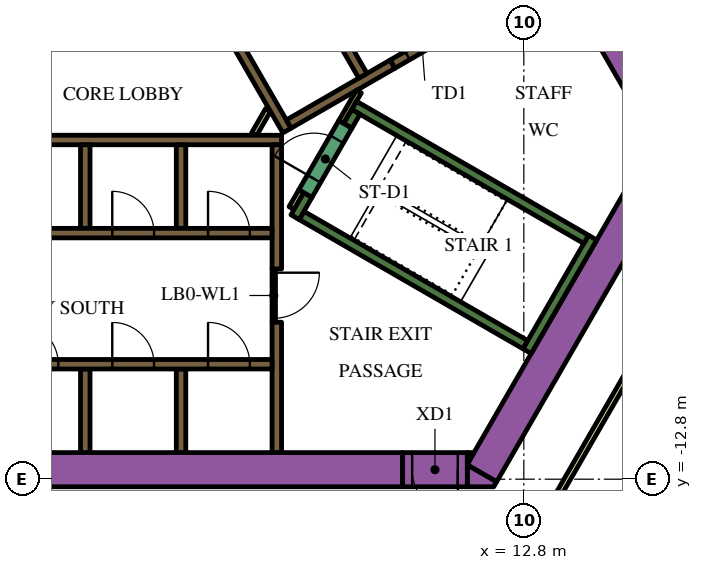
"""IFC4 building model, lengths in metres.
Left out: names, types, materials, properties, quantities, classifications, styles, units other than length and angle.
Written with IfcOpenShell. Run it as: python <this file> out.ifc"""

import sys

from ifc_helpers import new_model, si_unit, direction, frame, frame_2d, origin, place, context, subcontext, project, spatial, polyline, rectangle, outline, extrude, element, fill, save


model = new_model("IFC4")
c1 = context("Model", 3, precision=1e-05, world=origin(), true_north=direction((0.0, 1.0)))
c2 = subcontext(c1, "Body", "Model", "MODEL_VIEW")
j1 = project(units=[si_unit("LENGTHUNIT", "METRE"), si_unit("PLANEANGLEUNIT", "RADIAN")], contexts=[c1])
p1 = place(None, origin())
s1 = spatial("IfcSite", under=j1, at=p1, CompositionType="ELEMENT")
p2 = place(p1, origin())
s2 = spatial("IfcBuilding", under=s1, at=p2, CompositionType="ELEMENT")
p3 = place(p2, frame((0.0, 0.0, 111.0)))
s3 = spatial("IfcBuildingStorey", under=s2, at=p3, CompositionType="ELEMENT", Elevation=111.0)
p4 = place(p3, frame((6.711, 13.476, 0.0), z_axis=(0.0, 0.0, 1.0), x_axis=(0.500002723396, -0.866023831425, 0.0)))
e1 = element("IfcWall", 1, at=p4, inside=s3, PredefinedType="SOLIDWALL", context=c2, shape_type="SweptSolid", body=[
    extrude(rectangle(XDim=20.334, YDim=0.9, at=frame_2d((10.167, 0.0))), origin(), (0.0, 0.0, 1.0), 3.9),
])
p5 = place(p3, frame((11.695, -12.644, 0.0), z_axis=(0.0, 0.0, 1.0), x_axis=(0.500010229568, 0.86601949766, 0.0)))
e2 = element("IfcWall", 2, at=p5, inside=s3, PredefinedType="SOLIDWALL", context=c2, shape_type="SweptSolid", body=[
    extrude(rectangle(XDim=9.326, YDim=0.9, at=frame_2d((4.663, 0.0))), origin(), (0.0, 0.0, 1.0), 3.9),
])
p6 = place(p3, origin())
e3 = element("IfcWall", 3, at=p6, inside=s3, PredefinedType="SOLIDWALL", context=c2, shape_type="SweptSolid", body=[
    extrude(outline(polyline([(12.009, -13.0), (11.312, -13.0), (11.312, -12.425), (12.083, -12.871), (12.009, -13.0)])), origin(), (0.0, 0.0, 1.0), 3.9),
])
e4 = element("IfcWall", 4, at=p6, inside=s3, PredefinedType="SOLIDWALL", context=c2, shape_type="SweptSolid", body=[
    extrude(outline(polyline([(11.489, -12.1), (11.312, -12.407), (11.312, -12.1), (11.489, -12.1)])), origin(), (0.0, 0.0, 1.0), 3.9),
])
p7 = place(p3, frame((-12.019, -12.55, 0.0), z_axis=(0.0, 0.0, 1.0), x_axis=(1.0, 0.0, 0.0)))
e5 = element("IfcWall", 5, at=p7, inside=s3, PredefinedType="SOLIDWALL", context=c2, shape_type="SweptSolid", body=[
    extrude(rectangle(XDim=21.63, YDim=0.9, at=frame_2d((10.815, 0.0))), origin(), (0.0, 0.0, 1.0), 3.9),
])
p8 = place(p3, frame((12.885, -9.431, 0.0), z_axis=(0.0, 0.0, 1.0), x_axis=(0.500020560727, 0.866013532718, 0.0)))
e6 = element("IfcWall", 6, at=p8, inside=s3, PredefinedType="SOLIDWALL", context=c2, shape_type="SweptSolid", body=[
    extrude(rectangle(XDim=3.45, YDim=0.25, at=frame_2d((1.725, 0.0))), origin(), (0.0, 0.0, 1.0), 3.9),
])
p9 = place(p3, frame((12.84, -9.261, 0.0), z_axis=(0.0, 0.0, 1.0), x_axis=(-0.866013990052, 0.500019768644, 0.0)))
e7 = element("IfcWall", 7, at=p9, inside=s3, PredefinedType="SOLIDWALL", context=c2, shape_type="SweptSolid", body=[
    extrude(rectangle(XDim=6.8, YDim=0.25, at=frame_2d((3.4, 0.0))), origin(), (0.0, 0.0, 1.0), 3.9),
])
p10 = place(p3, frame((6.78, -5.906, 0.0), z_axis=(0.0, 0.0, 1.0), x_axis=(0.500223362819, 0.865896406789, 0.0)))
e8 = element("IfcWall", 8, at=p10, inside=s3, PredefinedType="SOLIDWALL", context=c2, shape_type="SweptSolid", body=[
    extrude(rectangle(XDim=0.675, YDim=0.25, at=frame_2d((0.337, 0.0))), origin(), (0.0, 0.0, 1.0), 3.9),
])
p11 = place(p3, frame((8.334, -2.964, 0.0), z_axis=(0.0, 0.0, 1.0), x_axis=(0.866016039709, -0.500016218704, 0.0)))
e9 = element("IfcWall", 9, at=p11, inside=s3, PredefinedType="SOLIDWALL", context=c2, shape_type="SweptSolid", body=[
    extrude(rectangle(XDim=7.05, YDim=0.25, at=frame_2d((3.525, 0.0))), origin(), (0.0, 0.0, 1.0), 3.9),
])
p12 = place(p3, frame((8.168, -3.503, 0.0), z_axis=(0.0, 0.0, 1.0), x_axis=(0.49972245349, 0.866185586049, 0.0)))
e10 = element("IfcWall", 10, at=p12, inside=s3, PredefinedType="SOLIDWALL", context=c2, shape_type="SweptSolid", body=[
    extrude(rectangle(XDim=0.425, YDim=0.25, at=frame_2d((0.212, 0.0))), origin(), (0.0, 0.0, 1.0), 3.9),
])
p13 = place(p3, frame((-5.545, -3.875, 0.0), z_axis=(0.0, 0.0, 1.0), x_axis=(1.0, 0.0, 0.0)))
e11 = element("IfcWall", 11, at=p13, inside=s3, PredefinedType="SOLIDWALL", context=c2, shape_type="SweptSolid", body=[
    extrude(rectangle(XDim=11.97, YDim=0.25, at=frame_2d((5.985, 0.0))), origin(), (0.0, 0.0, 1.0), 3.9),
])
p14 = place(p3, frame((6.3, -8.67, 0.0), z_axis=(0.0, 0.0, 1.0), x_axis=(0.0, -1.0, 0.0)))
e12 = element("IfcWall", 12, at=p14, inside=s3, PredefinedType="SOLIDWALL", context=c2, shape_type="SweptSolid", body=[
    extrude(rectangle(XDim=3.43, YDim=0.25, at=frame_2d((1.715, 0.0))), origin(), (0.0, 0.0, 1.0), 3.9),
])
p15 = place(p3, frame((6.3, -7.268, 0.0), z_axis=(0.0, 0.0, 1.0), x_axis=(0.0, 1.0, 0.0)))
e13 = element("IfcWall", 13, at=p15, inside=s3, PredefinedType="SOLIDWALL", context=c2, shape_type="SweptSolid", body=[
    extrude(rectangle(XDim=3.268, YDim=0.25, at=frame_2d((1.634, 0.0))), origin(), (0.0, 0.0, 1.0), 3.9),
])
for number, where, z_axis, x_axis in (
    (14, (3.78, -4.0, 0.0), (0.0, 0.0, 1.0), (0.0, -1.0, 0.0)),
    (15, (1.26, -4.0, 0.0), (0.0, 0.0, 1.0), (0.0, -1.0, 0.0)),
    (16, (3.78, -12.1, 0.0), (0.0, 0.0, 1.0), (0.0, 1.0, 0.0)),
    (17, (1.26, -12.1, 0.0), (0.0, 0.0, 1.0), (0.0, 1.0, 0.0)),
):
    element("IfcWall", number, at=place(p3, frame(where, z_axis=z_axis, x_axis=x_axis)), inside=s3, PredefinedType="SOLIDWALL", context=c2, shape_type="SweptSolid", body=[
        extrude(rectangle(XDim=2.2, YDim=0.25, at=frame_2d((1.1, 0.0))), origin(), (0.0, 0.0, 1.0), 3.9),
    ])
e18 = element("IfcWall", 18, at=p6, inside=s3, PredefinedType="SOLIDWALL", context=c2, shape_type="SweptSolid", body=[
    extrude(outline(polyline([(0.566, 6.725), (0.566, 6.875), (0.566, 6.875), (0.565, 6.875), (0.361, 6.875), (0.035, 7.439), (0.252, 7.564), (0.377, 7.348), (6.552, -3.348), (6.677, -3.564), (6.46, -3.689), (0.448, 6.725), (0.565, 6.725), (0.566, 6.725), (0.566, 6.725)])), origin(), (0.0, 0.0, 1.0), 3.9),
])
p16 = place(p3, frame((6.614, -3.456, 0.0), z_axis=(0.0, 0.0, 1.0), x_axis=(0.86602447079, 0.500001615989, 0.0)))
e19 = element("IfcWall", 19, at=p16, inside=s3, PredefinedType="SOLIDWALL", context=c2, shape_type="SweptSolid", body=[
    extrude(rectangle(XDim=3.154, YDim=0.25, at=frame_2d((1.577, 0.0))), origin(), (0.0, 0.0, 1.0), 3.9),
])
p17 = place(p3, frame((6.945, -5.222, 0.0), z_axis=(0.0, 0.0, 1.0), x_axis=(-0.499818422106, -0.866130212453, 0.0)))
e20 = element("IfcWall", 20, at=p17, inside=s3, PredefinedType="PARTITIONING", context=c2, shape_type="SweptSolid", body=[
    extrude(rectangle(XDim=0.514, YDim=0.15, at=frame_2d((0.257, 0.0))), origin(), (0.0, 0.0, 1.0), 2.75),
])
p18 = place(p3, frame((5.705, -3.718, 0.0), z_axis=(0.0, 0.0, 1.0), x_axis=(0.499962090823, 0.866047289552, 0.0)))
e21 = element("IfcWall", 21, at=p18, inside=s3, PredefinedType="PARTITIONING", context=c2, shape_type="SweptSolid", body=[
    extrude(rectangle(XDim=0.735, YDim=0.15, at=frame_2d((0.367, 0.0))), origin(), (0.0, 0.0, 1.0), 2.75),
])
p19 = place(p3, frame((8.459, -2.599, 0.0), z_axis=(0.0, 0.0, 1.0), x_axis=(-0.500041054325, -0.866001699761, 0.0)))
e22 = element("IfcWall", 22, at=p19, inside=s3, PredefinedType="PARTITIONING", context=c2, shape_type="SweptSolid", body=[
    extrude(rectangle(XDim=0.929, YDim=0.15, at=frame_2d((0.464, 0.0))), origin(), (0.0, 0.0, 1.0), 3.9),
])
p20 = place(p3, frame((-6.175, -9.775, 0.0), z_axis=(0.0, 0.0, 1.0), x_axis=(1.0, 0.0, 0.0)))
e23 = element("IfcWall", 23, at=p20, inside=s3, PredefinedType="SOLIDWALL", context=c2, shape_type="SweptSolid", body=[
    extrude(rectangle(XDim=12.35, YDim=0.25, at=frame_2d((6.175, 0.0))), origin(), (0.0, 0.0, 1.0), 3.9),
])
p21 = place(p20, frame((0.585, 0.0, 0.0)))
e24 = element("IfcOpeningElement", 24, at=p21, cuts=e23, PredefinedType="OPENING", context=c2, shape_type="SweptSolid", body=[
    extrude(rectangle(XDim=1.1, YDim=2.1, at=frame_2d((0.55, 1.05))), frame((0.0, 0.135, 0.0), z_axis=(0.0, -1.0, 0.0), x_axis=(1.0, 0.0, 0.0)), (0.0, 0.0, 1.0), 0.27),
])
p22 = place(p20, frame((3.105, 0.0, 0.0)))
e25 = element("IfcOpeningElement", 25, at=p22, cuts=e23, PredefinedType="OPENING", context=c2, shape_type="SweptSolid", body=[
    extrude(rectangle(XDim=1.1, YDim=2.1, at=frame_2d((0.55, 1.05))), frame((0.0, 0.135, 0.0), z_axis=(0.0, -1.0, 0.0), x_axis=(1.0, 0.0, 0.0)), (0.0, 0.0, 1.0), 0.27),
])
p23 = place(p20, frame((5.625, 0.0, 0.0)))
e26 = element("IfcOpeningElement", 26, at=p23, cuts=e23, PredefinedType="OPENING", context=c2, shape_type="SweptSolid", body=[
    extrude(rectangle(XDim=1.1, YDim=2.1, at=frame_2d((0.55, 1.05))), frame((0.0, 0.135, 0.0), z_axis=(0.0, -1.0, 0.0), x_axis=(1.0, 0.0, 0.0)), (0.0, 0.0, 1.0), 0.27),
])
p24 = place(p20, frame((8.145, 0.0, 0.0)))
e27 = element("IfcOpeningElement", 27, at=p24, cuts=e23, PredefinedType="OPENING", context=c2, shape_type="SweptSolid", body=[
    extrude(rectangle(XDim=1.1, YDim=2.1, at=frame_2d((0.55, 1.05))), frame((0.0, 0.135, 0.0), z_axis=(0.0, -1.0, 0.0), x_axis=(1.0, 0.0, 0.0)), (0.0, 0.0, 1.0), 0.27),
])
p25 = place(p20, frame((10.665, 0.0, 0.0)))
e28 = element("IfcOpeningElement", 28, at=p25, cuts=e23, PredefinedType="OPENING", context=c2, shape_type="SweptSolid", body=[
    extrude(rectangle(XDim=1.1, YDim=2.1, at=frame_2d((0.55, 1.05))), frame((0.0, 0.135, 0.0), z_axis=(0.0, -1.0, 0.0), x_axis=(1.0, 0.0, 0.0)), (0.0, 0.0, 1.0), 0.27),
])
p26 = place(p3, frame((-6.175, -6.325, 0.0), z_axis=(0.0, 0.0, 1.0), x_axis=(1.0, 0.0, 0.0)))
e29 = element("IfcWall", 29, at=p26, inside=s3, PredefinedType="SOLIDWALL", context=c2, shape_type="SweptSolid", body=[
    extrude(rectangle(XDim=12.35, YDim=0.25, at=frame_2d((6.175, 0.0))), origin(), (0.0, 0.0, 1.0), 3.9),
])
p27 = place(p26, frame((3.205, 0.0, 0.0)))
e30 = element("IfcOpeningElement", 30, at=p27, cuts=e29, PredefinedType="OPENING", context=c2, shape_type="SweptSolid", body=[
    extrude(rectangle(XDim=0.9, YDim=2.1, at=frame_2d((0.45, 1.05))), frame((0.0, 0.135, 0.0), z_axis=(0.0, -1.0, 0.0), x_axis=(1.0, 0.0, 0.0)), (0.0, 0.0, 1.0), 0.27),
])
p28 = place(p26, frame((8.145, 0.0, 0.0)))
e31 = element("IfcOpeningElement", 31, at=p28, cuts=e29, PredefinedType="OPENING", context=c2, shape_type="SweptSolid", body=[
    extrude(rectangle(XDim=1.1, YDim=2.1, at=frame_2d((0.55, 1.05))), frame((0.0, 0.135, 0.0), z_axis=(0.0, -1.0, 0.0), x_axis=(1.0, 0.0, 0.0)), (0.0, 0.0, 1.0), 0.27),
])
p29 = place(p26, frame((10.665, 0.0, 0.0)))
e32 = element("IfcOpeningElement", 32, at=p29, cuts=e29, PredefinedType="OPENING", context=c2, shape_type="SweptSolid", body=[
    extrude(rectangle(XDim=1.1, YDim=2.1, at=frame_2d((0.55, 1.05))), frame((0.0, 0.135, 0.0), z_axis=(0.0, -1.0, 0.0), x_axis=(1.0, 0.0, 0.0)), (0.0, 0.0, 1.0), 0.27),
])
p30 = place(p3, frame((8.565, -2.185, 0.0), z_axis=(0.0, 0.0, 1.0), x_axis=(-0.499997954832, 0.866026584559, 0.0)))
e33 = element("IfcWall", 33, at=p30, inside=s3, PredefinedType="SOLIDWALL", context=c2, shape_type="SweptSolid", body=[
    extrude(rectangle(XDim=12.35, YDim=0.25, at=frame_2d((6.175, 0.0))), origin(), (0.0, 0.0, 1.0), 3.9),
])
p31 = place(p30, frame((5.725, 0.0, 0.0)))
e34 = element("IfcOpeningElement", 34, at=p31, cuts=e33, PredefinedType="OPENING", context=c2, shape_type="SweptSolid", body=[
    extrude(rectangle(XDim=0.9, YDim=2.1, at=frame_2d((0.45, 1.05))), frame((0.0, 0.135, 0.0), z_axis=(0.0, -1.0, 0.0), x_axis=(1.0, 0.0, 0.0)), (0.0, 0.0, 1.0), 0.27),
])
p32 = place(p3, frame((7.053, -5.284, 0.0), z_axis=(0.0, 0.0, 1.0), x_axis=(0.500078061341, 0.865980330357, 0.0)))
e35 = element("IfcWall", 35, at=p32, inside=s3, PredefinedType="SOLIDWALL", context=c2, shape_type="SweptSolid", body=[
    extrude(rectangle(XDim=2.1, YDim=0.4, at=frame_2d((1.05, 0.0))), origin(), (0.0, 0.0, 1.0), 3.9),
])
p33 = place(p32, frame((0.45, 0.0, 0.0)))
e36 = element("IfcOpeningElement", 36, at=p33, cuts=e35, PredefinedType="OPENING", context=c2, shape_type="SweptSolid", body=[
    extrude(rectangle(XDim=1.2, YDim=2.1, at=frame_2d((0.6, 1.05))), frame((0.0, 0.21, 0.0), z_axis=(0.0, -1.0, 0.0), x_axis=(1.0, 0.0, 0.0)), (0.0, 0.0, 1.0), 0.42),
])
p34 = place(p3, frame((9.346, -1.879, 0.0), z_axis=(0.0, 0.0, 1.0), x_axis=(0.866047807691, 0.499961193289, 0.0)))
e37 = element("IfcWall", 37, at=p34, inside=s3, PredefinedType="SOLIDWALL", context=c2, shape_type="SweptSolid", body=[
    extrude(rectangle(XDim=1.8, YDim=0.25, at=frame_2d((0.9, 0.0))), origin(), (0.0, 0.0, 1.0), 3.9),
])
p35 = place(p34, frame((0.45, 0.0, 0.0)))
e38 = element("IfcOpeningElement", 38, at=p35, cuts=e37, PredefinedType="OPENING", context=c2, shape_type="SweptSolid", body=[
    extrude(rectangle(XDim=0.9, YDim=2.1, at=frame_2d((0.45, 1.05))), frame((0.0, 0.135, 0.0), z_axis=(0.0, -1.0, 0.0), x_axis=(1.0, 0.0, 0.0)), (0.0, 0.0, 1.0), 0.27),
])
p36 = place(p3, frame((6.22, -7.266, 0.0), z_axis=(0.0, 0.0, 1.0), x_axis=(0.0, -1.0, 0.0)))
e39 = element("IfcWall", 39, at=p36, inside=s3, PredefinedType="PARTITIONING", context=c2, shape_type="SweptSolid", body=[
    extrude(rectangle(XDim=1.4, YDim=0.09, at=frame_2d((0.7, 0.0))), origin(), (0.0, 0.0, 1.0), 2.75),
])
p37 = place(p36, frame((0.1, 0.0, 0.0)))
e40 = element("IfcOpeningElement", 40, at=p37, cuts=e39, PredefinedType="OPENING", context=c2, shape_type="SweptSolid", body=[
    extrude(rectangle(XDim=1.2, YDim=2.1, at=frame_2d((0.6, 1.05))), frame((0.0, 0.055, 0.0), z_axis=(0.0, -1.0, 0.0), x_axis=(1.0, 0.0, 0.0)), (0.0, 0.0, 1.0), 0.11),
])
p38 = place(p3, frame((11.312, -12.55, 0.0), z_axis=(0.0, 0.0, 1.0), x_axis=(-1.0, 0.0, 0.0)))
e41 = element("IfcWall", 41, at=p38, inside=s3, PredefinedType="SOLIDWALL", context=c2, shape_type="SweptSolid", body=[
    extrude(rectangle(XDim=1.7, YDim=0.9, at=frame_2d((0.85, 0.0))), origin(), (0.0, 0.0, 1.0), 3.9),
])
p39 = place(p38, frame((0.25, 0.0, 0.0)))
e42 = element("IfcOpeningElement", 42, at=p39, cuts=e41, PredefinedType="OPENING", context=c2, shape_type="SweptSolid", body=[
    extrude(rectangle(XDim=1.2, YDim=2.1, at=frame_2d((0.6, 1.05))), frame((0.0, 0.46, 0.0), z_axis=(0.0, -1.0, 0.0), x_axis=(1.0, 0.0, 0.0)), (0.0, 0.0, 1.0), 0.92),
])
p40 = place(p3, frame((6.163, 18.475, 0.0), z_axis=(0.0, 0.0, 1.0), x_axis=(0.500001317485, -0.866024643133, 0.0)))
e43 = element("IfcWall", 43, at=p40, inside=s3, PredefinedType="PARTITIONING", context=c2, shape_type="SweptSolid", body=[
    extrude(rectangle(XDim=25.767, YDim=0.15, at=frame_2d((12.883, 0.0))), origin(), (0.0, 0.0, 1.0), 2.75),
])
p41 = place(p40, frame((24.241, 0.0, 0.0)))
e44 = element("IfcOpeningElement", 44, at=p41, cuts=e43, PredefinedType="OPENING", context=c2, shape_type="SweptSolid", body=[
    extrude(rectangle(XDim=1.0, YDim=2.1, at=frame_2d((0.5, 1.05))), frame((0.0, 0.085, 0.0), z_axis=(0.0, -1.0, 0.0), x_axis=(1.0, 0.0, 0.0)), (0.0, 0.0, 1.0), 0.17),
])
p42 = place(p40, frame((13.144, 0.0, 0.0)))
e45 = element("IfcOpeningElement", 45, at=p42, cuts=e43, PredefinedType="OPENING", context=c2, shape_type="SweptSolid", body=[
    extrude(rectangle(XDim=1.0, YDim=2.1, at=frame_2d((0.5, 1.05))), frame((0.0, 0.085, 0.0), z_axis=(0.0, -1.0, 0.0), x_axis=(1.0, 0.0, 0.0)), (0.0, 0.0, 1.0), 0.17),
])
p43 = place(p40, frame((10.874, 0.0, 0.0)))
e46 = element("IfcOpeningElement", 46, at=p43, cuts=e43, PredefinedType="OPENING", context=c2, shape_type="SweptSolid", body=[
    extrude(rectangle(XDim=0.9, YDim=2.1, at=frame_2d((0.45, 1.05))), frame((0.0, 0.085, 0.0), z_axis=(0.0, -1.0, 0.0), x_axis=(1.0, 0.0, 0.0)), (0.0, 0.0, 1.0), 0.17),
])
p44 = place(p40, frame((3.718, 0.0, 0.0)))
e47 = element("IfcOpeningElement", 47, at=p44, cuts=e43, PredefinedType="OPENING", context=c2, shape_type="SweptSolid", body=[
    extrude(rectangle(XDim=1.0, YDim=2.1, at=frame_2d((0.5, 1.05))), frame((0.0, 0.085, 0.0), z_axis=(0.0, -1.0, 0.0), x_axis=(1.0, 0.0, 0.0)), (0.0, 0.0, 1.0), 0.17),
])
p45 = place(p40, frame((2.411, 0.0, 0.0)))
e48 = element("IfcOpeningElement", 48, at=p45, cuts=e43, PredefinedType="OPENING", context=c2, shape_type="SweptSolid", body=[
    extrude(rectangle(XDim=1.0, YDim=2.1, at=frame_2d((0.5, 1.05))), frame((0.0, 0.085, 0.0), z_axis=(0.0, -1.0, 0.0), x_axis=(1.0, 0.0, 0.0)), (0.0, 0.0, 1.0), 0.17),
])
p46 = place(p3, frame((15.587, -9.952, 0.0), z_axis=(0.0, 0.0, 1.0), x_axis=(-0.500016618951, -0.866015808616, 0.0)))
e49 = element("IfcWall", 49, at=p46, inside=s3, PredefinedType="PARTITIONING", context=c2, shape_type="SweptSolid", body=[
    extrude(rectangle(XDim=5.268, YDim=0.15, at=frame_2d((2.634, 0.0))), origin(), (0.0, 0.0, 1.0), 2.75),
])
p47 = place(p23, origin())
e50 = element("IfcDoor", 50, at=p47, inside=s3, OperationType="DOUBLE_DOOR_SLIDING", PredefinedType="DOOR", context=c2, shape_type="SweptSolid", body=[
    extrude(rectangle(XDim=1.1, YDim=2.1, at=frame_2d((0.55, 1.05))), frame((0.0, 0.025, 0.0), z_axis=(0.0, -1.0, 0.0), x_axis=(1.0, 0.0, 0.0)), (0.0, 0.0, 1.0), 0.05),
])
fill(e26, e50)
p48 = place(p24, origin())
e51 = element("IfcDoor", 51, at=p48, inside=s3, OperationType="DOUBLE_DOOR_SLIDING", PredefinedType="DOOR", context=c2, shape_type="SweptSolid", body=[
    extrude(rectangle(XDim=1.1, YDim=2.1, at=frame_2d((0.55, 1.05))), frame((0.0, 0.025, 0.0), z_axis=(0.0, -1.0, 0.0), x_axis=(1.0, 0.0, 0.0)), (0.0, 0.0, 1.0), 0.05),
])
fill(e27, e51)
p49 = place(p25, origin())
e52 = element("IfcDoor", 52, at=p49, inside=s3, OperationType="DOUBLE_DOOR_SLIDING", PredefinedType="DOOR", context=c2, shape_type="SweptSolid", body=[
    extrude(rectangle(XDim=1.1, YDim=2.1, at=frame_2d((0.55, 1.05))), frame((0.0, 0.025, 0.0), z_axis=(0.0, -1.0, 0.0), x_axis=(1.0, 0.0, 0.0)), (0.0, 0.0, 1.0), 0.05),
])
fill(e28, e52)
p50 = place(p28, origin())
e53 = element("IfcDoor", 53, at=p50, inside=s3, OperationType="DOUBLE_DOOR_SLIDING", PredefinedType="DOOR", context=c2, shape_type="SweptSolid", body=[
    extrude(rectangle(XDim=1.1, YDim=2.1, at=frame_2d((0.55, 1.05))), frame((0.0, 0.025, 0.0), z_axis=(0.0, -1.0, 0.0), x_axis=(1.0, 0.0, 0.0)), (0.0, 0.0, 1.0), 0.05),
])
fill(e31, e53)
p51 = place(p29, origin())
e54 = element("IfcDoor", 54, at=p51, inside=s3, OperationType="DOUBLE_DOOR_SLIDING", PredefinedType="DOOR", context=c2, shape_type="SweptSolid", body=[
    extrude(rectangle(XDim=1.1, YDim=2.1, at=frame_2d((0.55, 1.05))), frame((0.0, 0.025, 0.0), z_axis=(0.0, -1.0, 0.0), x_axis=(1.0, 0.0, 0.0)), (0.0, 0.0, 1.0), 0.05),
])
fill(e32, e54)
p52 = place(p33, origin())
e55 = element("IfcDoor", 55, at=p52, inside=s3, OperationType="SINGLE_SWING_LEFT", PredefinedType="DOOR", context=c2, shape_type="SweptSolid", body=[
    extrude(rectangle(XDim=1.2, YDim=2.1, at=frame_2d((0.6, 1.05))), frame((0.0, 0.025, 0.0), z_axis=(0.0, -1.0, 0.0), x_axis=(1.0, 0.0, 0.0)), (0.0, 0.0, 1.0), 0.05),
])
fill(e36, e55)
p53 = place(p35, origin())
e56 = element("IfcDoor", 56, at=p53, inside=s3, OperationType="SINGLE_SWING_LEFT", PredefinedType="DOOR", context=c2, shape_type="SweptSolid", body=[
    extrude(rectangle(XDim=0.9, YDim=2.1, at=frame_2d((0.45, 1.05))), frame((0.0, 0.025, 0.0), z_axis=(0.0, -1.0, 0.0), x_axis=(1.0, 0.0, 0.0)), (0.0, 0.0, 1.0), 0.05),
])
fill(e38, e56)
p54 = place(p37, origin())
e57 = element("IfcDoor", 57, at=p54, inside=s3, OperationType="SINGLE_SWING_LEFT", PredefinedType="DOOR", context=c2, shape_type="SweptSolid", body=[
    extrude(rectangle(XDim=1.2, YDim=2.1, at=frame_2d((0.6, 1.05))), frame((0.0, 0.025, 0.0), z_axis=(0.0, -1.0, 0.0), x_axis=(1.0, 0.0, 0.0)), (0.0, 0.0, 1.0), 0.05),
])
fill(e40, e57)
p55 = place(p39, origin())
e58 = element("IfcDoor", 58, at=p55, inside=s3, OperationType="SINGLE_SWING_LEFT", PredefinedType="DOOR", context=c2, shape_type="SweptSolid", body=[
    extrude(rectangle(XDim=1.2, YDim=2.1, at=frame_2d((0.6, 1.05))), frame((0.0, 0.025, 0.0), z_axis=(0.0, -1.0, 0.0), x_axis=(1.0, 0.0, 0.0)), (0.0, 0.0, 1.0), 0.05),
])
fill(e42, e58)
save(model, sys.argv[1])
